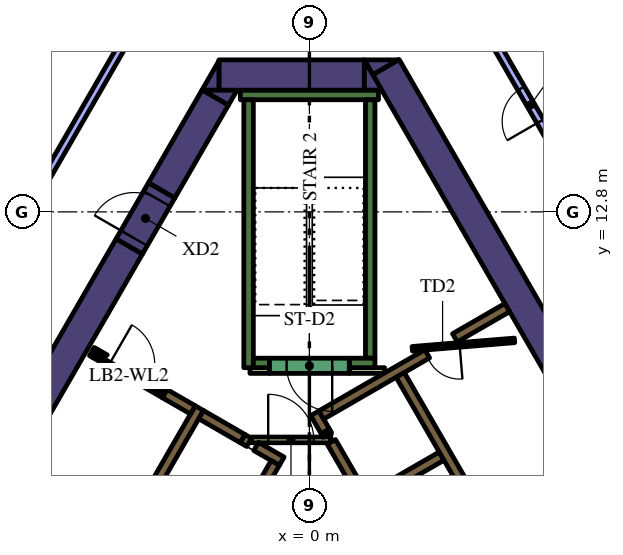
"""IFC4 building model, lengths in metres.
Left out: names, types, materials, properties, quantities, classifications, styles, units other than length and angle.
Written with IfcOpenShell. Run it as: python <this file> out.ifc"""

import sys

from ifc_helpers import new_model, si_unit, direction, frame, frame_2d, origin, place, context, subcontext, project, spatial, polyline, rectangle, outline, extrude, element, fill, save


model = new_model("IFC4")
c1 = context("Model", 3, precision=1e-05, world=origin(), true_north=direction((0.0, 1.0)))
c2 = subcontext(c1, "Body", "Model", "MODEL_VIEW")
j1 = project(units=[si_unit("LENGTHUNIT", "METRE"), si_unit("PLANEANGLEUNIT", "RADIAN")], contexts=[c1])
p1 = place(None, origin())
s1 = spatial("IfcSite", under=j1, at=p1, CompositionType="ELEMENT")
p2 = place(p1, origin())
s2 = spatial("IfcBuilding", under=s1, at=p2, CompositionType="ELEMENT")
p3 = place(p2, frame((0.0, 0.0, 166.8)))
s3 = spatial("IfcBuildingStorey", under=s2, at=p3, CompositionType="ELEMENT", Elevation=166.8)
p4 = place(p3, frame((8.279, 5.761, 0.0), z_axis=(0.0, 0.0, 1.0), x_axis=(-0.500010359015, 0.866019422922, 0.0)))
e1 = element("IfcWall", 1, at=p4, inside=s3, PredefinedType="SOLIDWALL", context=c2, shape_type="SweptSolid", body=[
    extrude(rectangle(XDim=12.528, YDim=0.8, at=frame_2d((6.264, 0.0))), origin(), (0.0, 0.0, 1.0), 4.2),
])
p5 = place(p3, origin())
e2 = element("IfcWall", 2, at=p5, inside=s3, PredefinedType="SOLIDWALL", context=c2, shape_type="SweptSolid", body=[
    extrude(outline(polyline([(1.443, 16.8), (2.339, 16.8), (1.667, 16.412), (1.443, 16.8)])), origin(), (0.0, 0.0, 1.0), 4.2),
])
p6 = place(p3, frame((-2.379, 16.4, 0.0), z_axis=(0.0, 0.0, 1.0), x_axis=(1.0, 0.0, 0.0)))
e3 = element("IfcWall", 3, at=p6, inside=s3, PredefinedType="SOLIDWALL", context=c2, shape_type="SweptSolid", body=[
    extrude(rectangle(XDim=3.824, YDim=0.8, at=frame_2d((1.912, 0.0))), origin(), (0.0, 0.0, 1.0), 4.2),
])
e4 = element("IfcWall", 4, at=p5, inside=s3, PredefinedType="SOLIDWALL", context=c2, shape_type="SweptSolid", body=[
    extrude(outline(polyline([(1.905, 16.0), (1.447, 16.0), (1.447, 16.793), (1.905, 16.0)])), origin(), (0.0, 0.0, 1.0), 4.2),
])
e5 = element("IfcWall", 5, at=p5, inside=s3, PredefinedType="SOLIDWALL", context=c2, shape_type="SweptSolid", body=[
    extrude(outline(polyline([(-2.829, 16.0), (-2.381, 16.776), (-2.381, 16.0), (-2.829, 16.0)])), origin(), (0.0, 0.0, 1.0), 4.2),
])
p7 = place(p3, frame((-2.477, 15.81, 0.0), z_axis=(0.0, 0.0, 1.0), x_axis=(-0.499969377405, -0.866043083026, 0.0)))
e6 = element("IfcWall", 6, at=p7, inside=s3, PredefinedType="SOLIDWALL", context=c2, shape_type="SweptSolid", body=[
    extrude(rectangle(XDim=2.824, YDim=0.8, at=frame_2d((1.412, 0.0))), origin(), (0.0, 0.0, 1.0), 4.2),
])
e7 = element("IfcWall", 7, at=p5, inside=s3, PredefinedType="SOLIDWALL", context=c2, shape_type="SweptSolid", body=[
    extrude(outline(polyline([(-1.905, 16.0), (-2.129, 15.612), (-2.801, 16.0), (-1.905, 16.0)])), origin(), (0.0, 0.0, 1.0), 4.2),
])
p8 = place(p3, frame((-12.668, -1.842, 0.0), z_axis=(0.0, 0.0, 1.0), x_axis=(0.500003640647, 0.866023301845, 0.0)))
e8 = element("IfcWall", 8, at=p8, inside=s3, PredefinedType="SOLIDWALL", context=c2, shape_type="SweptSolid", body=[
    extrude(rectangle(XDim=15.858, YDim=0.8, at=frame_2d((7.929, 0.0))), origin(), (0.0, 0.0, 1.0), 4.2),
])
p9 = place(p3, frame((-1.817, 15.875, 0.0), z_axis=(0.0, 0.0, 1.0), x_axis=(1.0, 0.0, 0.0)))
e9 = element("IfcWall", 9, at=p9, inside=s3, PredefinedType="SOLIDWALL", context=c2, shape_type="SweptSolid", body=[
    extrude(rectangle(XDim=3.634, YDim=0.25, at=frame_2d((1.817, 0.0))), origin(), (0.0, 0.0, 1.0), 4.2),
])
p10 = place(p3, frame((1.6, 8.95, 0.0), z_axis=(0.0, 0.0, 1.0), x_axis=(0.0, 1.0, 0.0)))
e10 = element("IfcWall", 10, at=p10, inside=s3, PredefinedType="SOLIDWALL", context=c2, shape_type="SweptSolid", body=[
    extrude(rectangle(XDim=6.8, YDim=0.25, at=frame_2d((3.4, 0.0))), origin(), (0.0, 0.0, 1.0), 4.2),
])
p11 = place(p3, frame((1.05, 8.825, 0.0), z_axis=(0.0, 0.0, 1.0), x_axis=(1.0, 0.0, 0.0)))
e11 = element("IfcWall", 11, at=p11, inside=s3, PredefinedType="SOLIDWALL", context=c2, shape_type="SweptSolid", body=[
    extrude(rectangle(XDim=0.675, YDim=0.25, at=frame_2d((0.337, 0.0))), origin(), (0.0, 0.0, 1.0), 4.2),
])
p12 = place(p3, frame((-1.6, 8.7, 0.0), z_axis=(0.0, 0.0, 1.0), x_axis=(0.0, 1.0, 0.0)))
e12 = element("IfcWall", 12, at=p12, inside=s3, PredefinedType="SOLIDWALL", context=c2, shape_type="SweptSolid", body=[
    extrude(rectangle(XDim=7.05, YDim=0.25, at=frame_2d((3.525, 0.0))), origin(), (0.0, 0.0, 1.0), 4.2),
])
p13 = place(p3, frame((-1.475, 8.825, 0.0), z_axis=(0.0, 0.0, 1.0), x_axis=(1.0, 0.0, 0.0)))
e13 = element("IfcWall", 13, at=p13, inside=s3, PredefinedType="SOLIDWALL", context=c2, shape_type="SweptSolid", body=[
    extrude(rectangle(XDim=0.425, YDim=0.25, at=frame_2d((0.212, 0.0))), origin(), (0.0, 0.0, 1.0), 4.2),
])
p14 = place(p3, frame((0.473, 6.93, 0.0), z_axis=(0.0, 0.0, 1.0), x_axis=(-0.49972245349, 0.866185586049, 0.0)))
e14 = element("IfcWall", 14, at=p14, inside=s3, PredefinedType="SOLIDWALL", context=c2, shape_type="SweptSolid", body=[
    extrude(rectangle(XDim=0.11, YDim=0.25, at=frame_2d((0.055, 0.0))), origin(), (0.0, 0.0, 1.0), 4.2),
])
p15 = place(p3, frame((6.568, -3.627, 0.0), z_axis=(0.0, 0.0, 1.0), x_axis=(-0.499999455981, 0.866025717874, 0.0)))
e15 = element("IfcWall", 15, at=p15, inside=s3, PredefinedType="SOLIDWALL", context=c2, shape_type="SweptSolid", body=[
    extrude(rectangle(XDim=11.978, YDim=0.25, at=frame_2d((5.989, 0.0))), origin(), (0.0, 0.0, 1.0), 4.2),
])
p16 = place(p3, frame((0.417, 7.027, 0.0), z_axis=(0.0, 0.0, 1.0), x_axis=(-0.500210807569, 0.865903659763, 0.0)))
e16 = element("IfcWall", 16, at=p16, inside=s3, PredefinedType="SOLIDWALL", context=c2, shape_type="SweptSolid", body=[
    extrude(rectangle(XDim=0.548, YDim=0.25, at=frame_2d((0.274, 0.0))), origin(), (0.0, 0.0, 1.0), 4.2),
])
p17 = place(p3, frame((3.1, 9.064, 0.0), z_axis=(0.0, 0.0, 1.0), x_axis=(-0.866030133475, -0.499991807846, 0.0)))
e17 = element("IfcWall", 17, at=p17, inside=s3, PredefinedType="SOLIDWALL", context=c2, shape_type="SweptSolid", body=[
    extrude(rectangle(XDim=3.217, YDim=0.25, at=frame_2d((1.608, 0.0))), origin(), (0.0, 0.0, 1.0), 4.2),
])
p18 = place(p3, frame((1.574, 5.274, 0.0), z_axis=(0.0, 0.0, 1.0), x_axis=(0.866028486751, 0.499994660107, 0.0)))
e18 = element("IfcWall", 18, at=p18, inside=s3, PredefinedType="SOLIDWALL", context=c2, shape_type="SweptSolid", body=[
    extrude(rectangle(XDim=2.2, YDim=0.25, at=frame_2d((1.1, 0.0))), origin(), (0.0, 0.0, 1.0), 4.2),
])
p19 = place(p3, frame((3.83, 9.486, 0.0), z_axis=(0.0, 0.0, 1.0), x_axis=(0.865986202621, 0.500067892261, 0.0)))
e19 = element("IfcWall", 19, at=p19, inside=s3, PredefinedType="SOLIDWALL", context=c2, shape_type="SweptSolid", body=[
    extrude(rectangle(XDim=1.591, YDim=0.25, at=frame_2d((0.795, 0.0))), origin(), (0.0, 0.0, 1.0), 4.2),
])
p20 = place(p3, frame((-8.06, -1.311, 0.0), z_axis=(0.0, 0.0, 1.0), x_axis=(0.50000273126, 0.866023826885, 0.0)))
e20 = element("IfcWall", 20, at=p20, inside=s3, PredefinedType="SOLIDWALL", context=c2, shape_type="SweptSolid", body=[
    extrude(rectangle(XDim=10.33, YDim=0.25, at=frame_2d((5.165, 0.0))), origin(), (0.0, 0.0, 1.0), 4.2),
])
p21 = place(p3, frame((-1.758, 6.835, 0.0), z_axis=(0.0, 0.0, 1.0), x_axis=(0.865982457891, -0.500074377092, 0.0)))
e21 = element("IfcWall", 21, at=p21, inside=s3, PredefinedType="SOLIDWALL", context=c2, shape_type="SweptSolid", body=[
    extrude(rectangle(XDim=0.2, YDim=0.25, at=frame_2d((0.1, 0.0))), origin(), (0.0, 0.0, 1.0), 4.2),
])
p22 = place(p3, frame((-1.76, 6.836, 0.0), z_axis=(0.0, 0.0, 1.0), x_axis=(-0.865952863304, 0.500125622755, 0.0)))
e22 = element("IfcWall", 22, at=p22, inside=s3, PredefinedType="SOLIDWALL", context=c2, shape_type="SweptSolid", body=[
    extrude(rectangle(XDim=1.258, YDim=0.25, at=frame_2d((0.629, 0.0))), origin(), (0.0, 0.0, 1.0), 4.2),
])
p23 = place(p3, frame((-0.728, 6.24, 0.0), z_axis=(0.0, 0.0, 1.0), x_axis=(-0.865955664968, 0.500120771724, 0.0)))
e23 = element("IfcWall", 23, at=p23, inside=s3, PredefinedType="SOLIDWALL", context=c2, shape_type="SweptSolid", body=[
    extrude(rectangle(XDim=0.778, YDim=0.25, at=frame_2d((0.389, 0.0))), origin(), (0.0, 0.0, 1.0), 4.2),
])
p24 = place(p3, frame((-5.725, 9.125, 0.0), z_axis=(0.0, 0.0, 1.0), x_axis=(0.866185586049, -0.49972245349, 0.0)))
e24 = element("IfcWall", 24, at=p24, inside=s3, PredefinedType="SOLIDWALL", context=c2, shape_type="SweptSolid", body=[
    extrude(rectangle(XDim=0.11, YDim=0.25, at=frame_2d((0.055, 0.0))), origin(), (0.0, 0.0, 1.0), 4.2),
])
p25 = place(p3, frame((-3.066, 7.59, 0.0), z_axis=(0.0, 0.0, 1.0), x_axis=(-0.866081358704, 0.49990307071, 0.0)))
e25 = element("IfcWall", 25, at=p25, inside=s3, PredefinedType="SOLIDWALL", context=c2, shape_type="SweptSolid", body=[
    extrude(rectangle(XDim=0.858, YDim=0.25, at=frame_2d((0.429, 0.0))), origin(), (0.0, 0.0, 1.0), 4.2),
])
e26 = element("IfcWall", 26, at=p5, inside=s3, PredefinedType="SOLIDWALL", context=c2, shape_type="SweptSolid", body=[
    extrude(outline(polyline([(-3.748, 8.128), (-3.813, 8.015), (-4.027, 8.139), (-4.017, 8.156), (-4.008, 8.173), (-4.0, 8.192), (-3.995, 8.21), (-3.991, 8.23), (-3.99, 8.25), (-3.99, 8.268), (-3.748, 8.128)])), origin(), (0.0, 0.0, 1.0), 4.2),
])
e27 = element("IfcWall", 27, at=p5, inside=s3, PredefinedType="SOLIDWALL", context=c2, shape_type="SweptSolid", body=[
    extrude(outline(polyline([(-5.689, 8.96), (-5.69, 8.961), (-5.565, 9.177), (-5.319, 9.035), (-5.335, 9.026), (-5.351, 9.015), (-5.366, 9.002), (-5.379, 8.988), (-5.392, 8.972), (-5.402, 8.956), (-5.412, 8.939), (-5.629, 9.064), (-5.629, 9.064), (-5.689, 8.96)])), origin(), (0.0, 0.0, 1.0), 4.2),
])
p26 = place(p3, frame((1.05, 8.625, 0.0), z_axis=(0.0, 0.0, 1.0), x_axis=(1.0, 0.0, 0.0)))
e28 = element("IfcWall", 28, at=p26, inside=s3, PredefinedType="PARTITIONING", context=c2, shape_type="SweptSolid", body=[
    extrude(rectangle(XDim=0.929, YDim=0.15, at=frame_2d((0.464, 0.0))), origin(), (0.0, 0.0, 1.0), 3.15),
])
p27 = place(p3, frame((-1.564, 8.625, 0.0), z_axis=(0.0, 0.0, 1.0), x_axis=(1.0, 0.0, 0.0)))
e29 = element("IfcWall", 29, at=p27, inside=s3, PredefinedType="PARTITIONING", context=c2, shape_type="SweptSolid", body=[
    extrude(rectangle(XDim=0.514, YDim=0.15, at=frame_2d((0.257, 0.0))), origin(), (0.0, 0.0, 1.0), 3.15),
])
p28 = place(p3, frame((8.565, -2.185, 0.0), z_axis=(0.0, 0.0, 1.0), x_axis=(-0.499997954832, 0.866026584559, 0.0)))
e30 = element("IfcWall", 30, at=p28, inside=s3, PredefinedType="SOLIDWALL", context=c2, shape_type="SweptSolid", body=[
    extrude(rectangle(XDim=12.35, YDim=0.25, at=frame_2d((6.175, 0.0))), origin(), (0.0, 0.0, 1.0), 4.2),
])
p29 = place(p28, frame((0.585, 0.0, 0.0)))
e31 = element("IfcOpeningElement", 31, at=p29, cuts=e30, PredefinedType="OPENING", context=c2, shape_type="SweptSolid", body=[
    extrude(rectangle(XDim=1.1, YDim=2.1, at=frame_2d((0.55, 1.05))), frame((0.0, 0.135, 0.0), z_axis=(0.0, -1.0, 0.0), x_axis=(1.0, 0.0, 0.0)), (0.0, 0.0, 1.0), 0.27),
])
p30 = place(p3, frame((-0.898, 6.194, 0.0), z_axis=(0.0, 0.0, 1.0), x_axis=(-0.499996202215, -0.866027596426, 0.0)))
e32 = element("IfcWall", 32, at=p30, inside=s3, PredefinedType="SOLIDWALL", context=c2, shape_type="SweptSolid", body=[
    extrude(rectangle(XDim=9.83, YDim=0.25, at=frame_2d((4.915, 0.0))), origin(), (0.0, 0.0, 1.0), 4.2),
])
p31 = place(p30, frame((0.585, 0.0, 0.0)))
e33 = element("IfcOpeningElement", 33, at=p31, cuts=e32, PredefinedType="OPENING", context=c2, shape_type="SweptSolid", body=[
    extrude(rectangle(XDim=1.1, YDim=2.1, at=frame_2d((0.55, 1.05))), frame((0.0, 0.135, 0.0), z_axis=(0.0, -1.0, 0.0), x_axis=(1.0, 0.0, 0.0)), (0.0, 0.0, 1.0), 0.27),
])
p32 = place(p30, frame((3.105, 0.0, 0.0)))
e34 = element("IfcOpeningElement", 34, at=p32, cuts=e32, PredefinedType="OPENING", context=c2, shape_type="SweptSolid", body=[
    extrude(rectangle(XDim=1.1, YDim=2.1, at=frame_2d((0.55, 1.05))), frame((0.0, 0.135, 0.0), z_axis=(0.0, -1.0, 0.0), x_axis=(1.0, 0.0, 0.0)), (0.0, 0.0, 1.0), 0.27),
])
p33 = place(p30, frame((5.625, 0.0, 0.0)))
e35 = element("IfcOpeningElement", 35, at=p33, cuts=e32, PredefinedType="OPENING", context=c2, shape_type="SweptSolid", body=[
    extrude(rectangle(XDim=1.1, YDim=2.1, at=frame_2d((0.55, 1.05))), frame((0.0, 0.135, 0.0), z_axis=(0.0, -1.0, 0.0), x_axis=(1.0, 0.0, 0.0)), (0.0, 0.0, 1.0), 0.27),
])
p34 = place(p30, frame((8.145, 0.0, 0.0)))
e36 = element("IfcOpeningElement", 36, at=p34, cuts=e32, PredefinedType="OPENING", context=c2, shape_type="SweptSolid", body=[
    extrude(rectangle(XDim=1.1, YDim=2.1, at=frame_2d((0.55, 1.05))), frame((0.0, 0.135, 0.0), z_axis=(0.0, -1.0, 0.0), x_axis=(1.0, 0.0, 0.0)), (0.0, 0.0, 1.0), 0.27),
])
p35 = place(p3, frame((1.05, 8.75, 0.0), z_axis=(0.0, 0.0, 1.0), x_axis=(-1.0, 0.0, 0.0)))
e37 = element("IfcWall", 37, at=p35, inside=s3, PredefinedType="SOLIDWALL", context=c2, shape_type="SweptSolid", body=[
    extrude(rectangle(XDim=2.1, YDim=0.4, at=frame_2d((1.05, 0.0))), origin(), (0.0, 0.0, 1.0), 4.2),
])
p36 = place(p35, frame((0.45, 0.0, 0.0)))
e38 = element("IfcOpeningElement", 38, at=p36, cuts=e37, PredefinedType="OPENING", context=c2, shape_type="SweptSolid", body=[
    extrude(rectangle(XDim=1.2, YDim=2.1, at=frame_2d((0.6, 1.05))), frame((0.0, 0.21, 0.0), z_axis=(0.0, -1.0, 0.0), x_axis=(1.0, 0.0, 0.0)), (0.0, 0.0, 1.0), 0.42),
])
p37 = place(p3, frame((5.398, 9.419, 0.0), z_axis=(0.0, 0.0, 1.0), x_axis=(-0.996653416376, -0.081743303248, 0.0)))
e39 = element("IfcWall", 39, at=p37, inside=s3, PredefinedType="PARTITIONING", context=c2, shape_type="SweptSolid", body=[
    extrude(rectangle(XDim=2.7, YDim=0.12, at=frame_2d((1.35, 0.0))), origin(), (0.0, 0.0, 1.0), 3.15),
])
p38 = place(p37, frame((1.45, 0.0, 0.0)))
e40 = element("IfcOpeningElement", 40, at=p38, cuts=e39, PredefinedType="OPENING", context=c2, shape_type="SweptSolid", body=[
    extrude(rectangle(XDim=0.9, YDim=2.1, at=frame_2d((0.45, 1.05))), frame((0.0, 0.07, 0.0), z_axis=(0.0, -1.0, 0.0), x_axis=(1.0, 0.0, 0.0)), (0.0, 0.0, 1.0), 0.14),
])
p39 = place(p3, frame((-1.534, 6.8, 0.0), z_axis=(0.0, 0.0, 1.0), x_axis=(1.0, 0.0, 0.0)))
e41 = element("IfcWall", 41, at=p39, inside=s3, PredefinedType="PARTITIONING", context=c2, shape_type="SweptSolid", body=[
    extrude(rectangle(XDim=2.1, YDim=0.15, at=frame_2d((1.05, 0.0))), origin(), (0.0, 0.0, 1.0), 3.15),
])
p40 = place(p39, frame((0.45, 0.0, 0.0)))
e42 = element("IfcOpeningElement", 42, at=p40, cuts=e41, PredefinedType="OPENING", context=c2, shape_type="SweptSolid", body=[
    extrude(rectangle(XDim=1.2, YDim=2.1, at=frame_2d((0.6, 1.05))), frame((0.0, 0.085, 0.0), z_axis=(0.0, -1.0, 0.0), x_axis=(1.0, 0.0, 0.0)), (0.0, 0.0, 1.0), 0.17),
])
p41 = place(p3, frame((-5.659, 9.012, 0.0), z_axis=(0.0, 0.0, 1.0), x_axis=(0.866009402589, -0.500027713859, 0.0)))
e43 = element("IfcWall", 43, at=p41, inside=s3, PredefinedType="PARTITIONING", context=c2, shape_type="SweptSolid", body=[
    extrude(rectangle(XDim=2.1, YDim=0.12, at=frame_2d((1.05, 0.0))), origin(), (0.0, 0.0, 1.0), 3.15),
])
p42 = place(p41, frame((0.45, 0.0, 0.0)))
e44 = element("IfcOpeningElement", 44, at=p42, cuts=e43, PredefinedType="OPENING", context=c2, shape_type="SweptSolid", body=[
    extrude(rectangle(XDim=1.2, YDim=2.1, at=frame_2d((0.6, 1.05))), frame((0.0, 0.07, 0.0), z_axis=(0.0, -1.0, 0.0), x_axis=(1.0, 0.0, 0.0)), (0.0, 0.0, 1.0), 0.14),
])
p43 = place(p3, frame((-4.739, 11.892, 0.0), z_axis=(0.0, 0.0, 1.0), x_axis=(0.500062241894, 0.865989465428, 0.0)))
e45 = element("IfcWall", 45, at=p43, inside=s3, PredefinedType="SOLIDWALL", context=c2, shape_type="SweptSolid", body=[
    extrude(rectangle(XDim=1.7, YDim=0.8, at=frame_2d((0.85, 0.0))), origin(), (0.0, 0.0, 1.0), 4.2),
])
p44 = place(p43, frame((0.25, 0.0, 0.0)))
e46 = element("IfcOpeningElement", 46, at=p44, cuts=e45, PredefinedType="OPENING", context=c2, shape_type="SweptSolid", body=[
    extrude(rectangle(XDim=1.2, YDim=2.1, at=frame_2d((0.6, 1.05))), frame((0.0, 0.41, 0.0), z_axis=(0.0, -1.0, 0.0), x_axis=(1.0, 0.0, 0.0)), (0.0, 0.0, 1.0), 0.82),
])
p45 = place(p3, frame((7.872, 12.064, 0.0), z_axis=(0.0, 0.0, 1.0), x_axis=(-0.499995192696, 0.866028179265, 0.0)))
e47 = element("IfcWall", 47, at=p45, inside=s3, PredefinedType="PARTITIONING", context=c2, shape_type="SweptSolid", body=[
    extrude(rectangle(XDim=8.239, YDim=0.2, at=frame_2d((4.12, 0.0))), origin(), (0.0, 0.0, 1.0), 3.15),
])
p46 = place(p45, frame((3.6, 0.0, 0.0)))
e48 = element("IfcOpeningElement", 48, at=p46, cuts=e47, PredefinedType="OPENING", context=c2, shape_type="SweptSolid", body=[
    extrude(rectangle(XDim=1.0, YDim=2.1, at=frame_2d((0.5, 1.05))), frame((0.0, 0.11, 0.0), z_axis=(0.0, -1.0, 0.0), x_axis=(1.0, 0.0, 0.0)), (0.0, 0.0, 1.0), 0.22),
])
p47 = place(p3, frame((-4.757, 17.461, 0.0), z_axis=(0.0, 0.0, 1.0), x_axis=(-0.499998278779, -0.866026397529, 0.0)))
e49 = element("IfcWall", 49, at=p47, inside=s3, PredefinedType="PARTITIONING", context=c2, shape_type="SweptSolid", body=[
    extrude(rectangle(XDim=8.709, YDim=0.2, at=frame_2d((4.354, 0.0))), origin(), (0.0, 0.0, 1.0), 3.15),
])
p48 = place(p36, origin())
e50 = element("IfcDoor", 50, at=p48, inside=s3, OperationType="SINGLE_SWING_LEFT", PredefinedType="DOOR", context=c2, shape_type="SweptSolid", body=[
    extrude(rectangle(XDim=1.2, YDim=2.1, at=frame_2d((0.6, 1.05))), frame((0.0, 0.025, 0.0), z_axis=(0.0, -1.0, 0.0), x_axis=(1.0, 0.0, 0.0)), (0.0, 0.0, 1.0), 0.05),
])
fill(e38, e50)
p49 = place(p38, origin())
e51 = element("IfcDoor", 51, at=p49, inside=s3, OperationType="SINGLE_SWING_LEFT", PredefinedType="DOOR", context=c2, shape_type="SweptSolid", body=[
    extrude(rectangle(XDim=0.9, YDim=2.1, at=frame_2d((0.45, 1.05))), frame((0.0, 0.025, 0.0), z_axis=(0.0, -1.0, 0.0), x_axis=(1.0, 0.0, 0.0)), (0.0, 0.0, 1.0), 0.05),
])
fill(e40, e51)
p50 = place(p40, origin())
e52 = element("IfcDoor", 52, at=p50, inside=s3, OperationType="SINGLE_SWING_LEFT", PredefinedType="DOOR", context=c2, shape_type="SweptSolid", body=[
    extrude(rectangle(XDim=1.2, YDim=2.1, at=frame_2d((0.6, 1.05))), frame((0.0, 0.025, 0.0), z_axis=(0.0, -1.0, 0.0), x_axis=(1.0, 0.0, 0.0)), (0.0, 0.0, 1.0), 0.05),
])
fill(e42, e52)
p51 = place(p42, origin())
e53 = element("IfcDoor", 53, at=p51, inside=s3, OperationType="SINGLE_SWING_LEFT", PredefinedType="DOOR", context=c2, shape_type="SweptSolid", body=[
    extrude(rectangle(XDim=1.2, YDim=2.1, at=frame_2d((0.6, 1.05))), frame((0.0, 0.025, 0.0), z_axis=(0.0, -1.0, 0.0), x_axis=(1.0, 0.0, 0.0)), (0.0, 0.0, 1.0), 0.05),
])
fill(e44, e53)
p52 = place(p44, origin())
e54 = element("IfcDoor", 54, at=p52, inside=s3, OperationType="SINGLE_SWING_LEFT", PredefinedType="DOOR", context=c2, shape_type="SweptSolid", body=[
    extrude(rectangle(XDim=1.2, YDim=2.1, at=frame_2d((0.6, 1.05))), frame((0.0, 0.025, 0.0), z_axis=(0.0, -1.0, 0.0), x_axis=(1.0, 0.0, 0.0)), (0.0, 0.0, 1.0), 0.05),
])
fill(e46, e54)
p53 = place(p46, origin())
e55 = element("IfcDoor", 55, at=p53, inside=s3, OperationType="SINGLE_SWING_LEFT", PredefinedType="DOOR", context=c2, shape_type="SweptSolid", body=[
    extrude(rectangle(XDim=1.0, YDim=2.1, at=frame_2d((0.5, 1.05))), frame((0.0, 0.025, 0.0), z_axis=(0.0, -1.0, 0.0), x_axis=(1.0, 0.0, 0.0)), (0.0, 0.0, 1.0), 0.05),
])
fill(e48, e55)
save(model, sys.argv[1])
